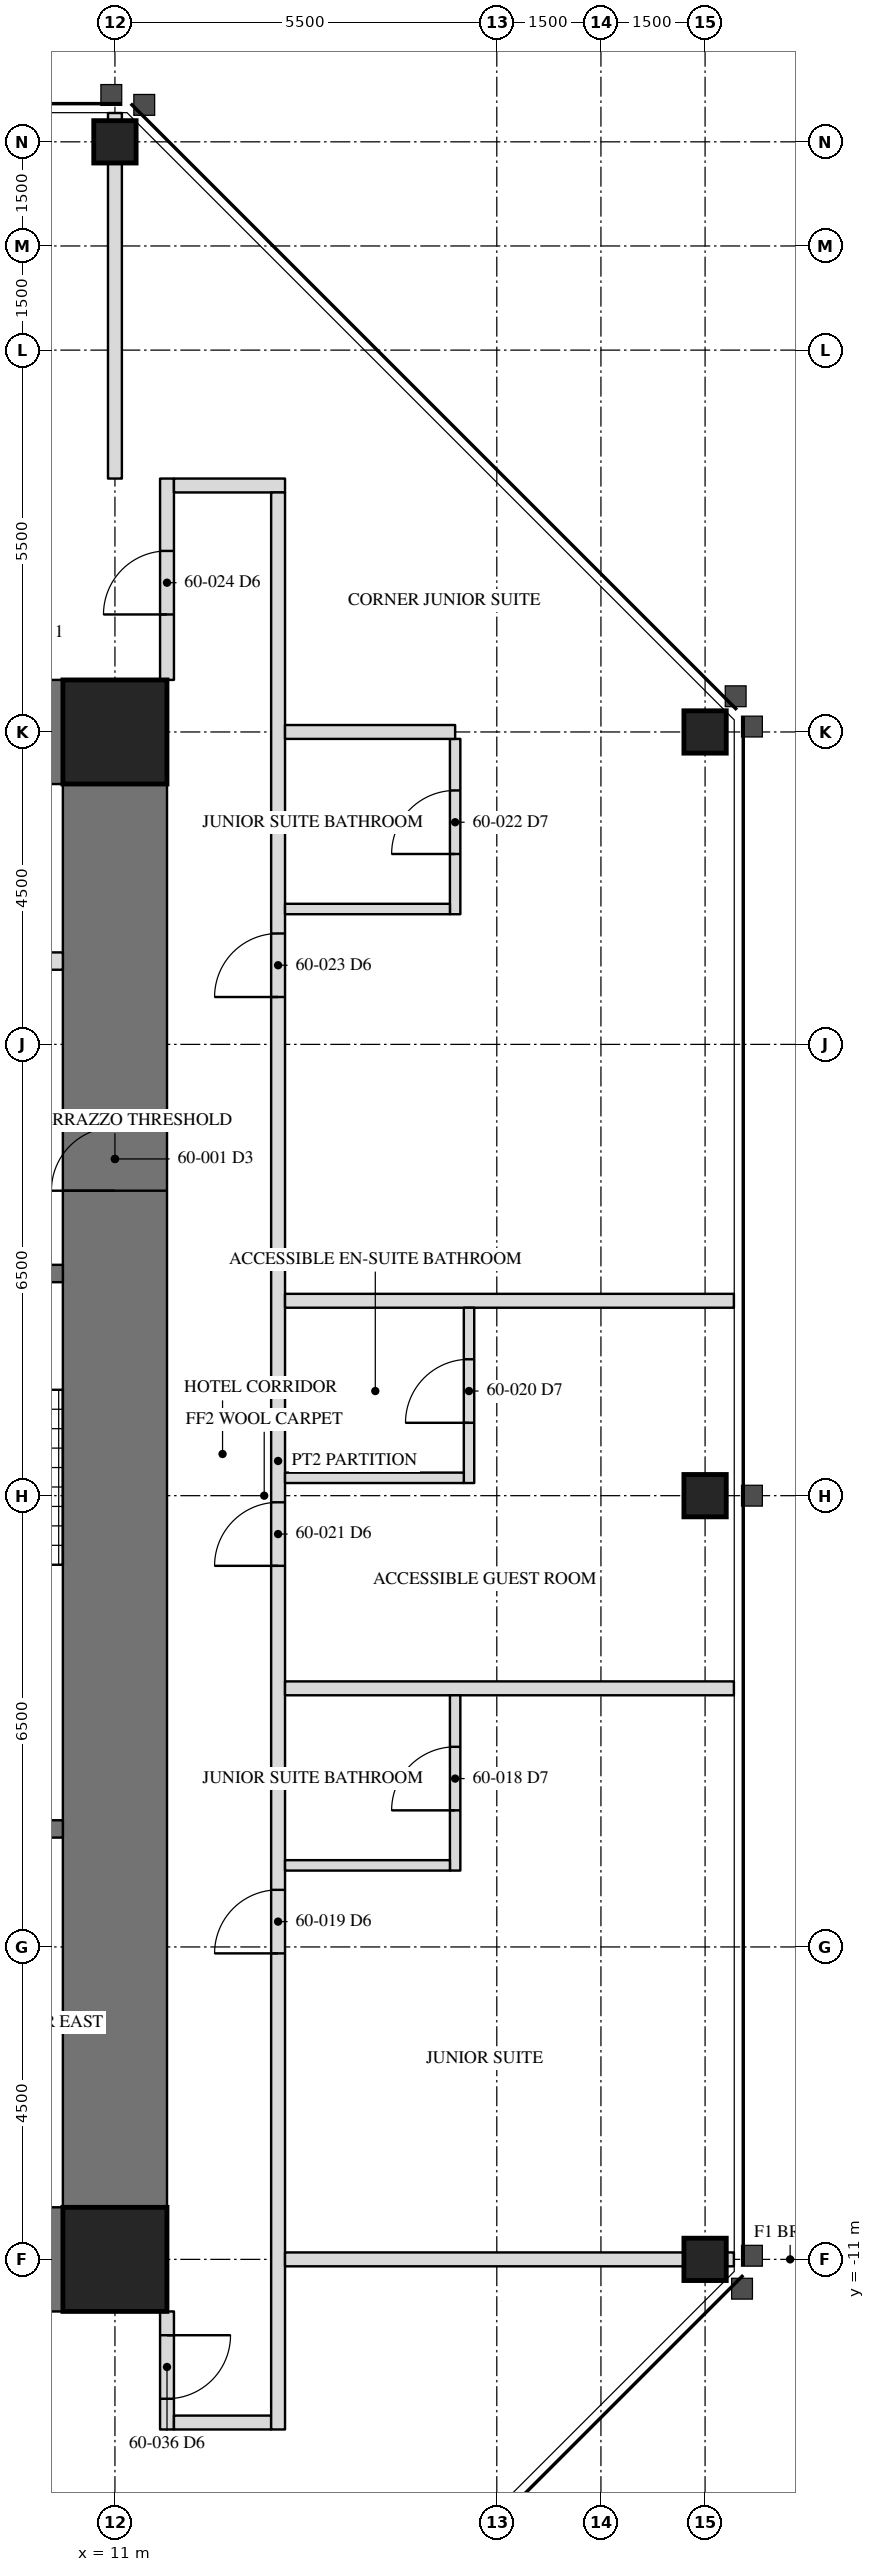
"""IFC4 building model, lengths in metres.
Left out: names, types, materials, properties, quantities, classifications, styles, units other than length and angle.
Written with IfcOpenShell. Run it as: python <this file> out.ifc"""

import sys

from ifc_helpers import new_model, si_unit, direction, frame, frame_2d, origin, origin_2d, place, context, subcontext, project, spatial, rectangle, hollow_rectangle, extrude, element, fill, save


model = new_model("IFC4")
c1 = context("Model", 3, precision=1e-05, world=origin(), true_north=direction((0.0, 1.0)))
c2 = subcontext(c1, "Body", "Model", "MODEL_VIEW")
j1 = project(units=[si_unit("LENGTHUNIT", "METRE"), si_unit("PLANEANGLEUNIT", "RADIAN")], contexts=[c1])
p1 = place(None, origin())
s1 = spatial("IfcSite", under=j1, at=p1, CompositionType="ELEMENT")
p2 = place(p1, origin())
s2 = spatial("IfcBuilding", under=s1, at=p2, CompositionType="ELEMENT")
p3 = place(p2, frame((0.0, 0.0, 246.7)))
s3 = spatial("IfcBuildingStorey", under=s2, at=p3, CompositionType="ELEMENT", Elevation=246.7)
for number, where, z_axis, x_axis in (
    (1, (19.5, -11.0, 0.0), (0.0, 0.0, 1.0), (0.0, 1.0, 0.0)),
    (2, (19.5, 0.0, 0.0), (0.0, 0.0, 1.0), (0.0, 1.0, 0.0)),
    (3, (19.5, 11.0, 0.0), (0.0, 0.0, 1.0), (0.0, 1.0, 0.0)),
    (4, (11.0, 19.5, 0.0), (0.0, 0.0, 1.0), (1.0, 0.0, 0.0)),
):
    element("IfcColumn", number, at=place(p3, frame(where, z_axis=z_axis, x_axis=x_axis)), inside=s3, PredefinedType="COLUMN", context=c2, shape_type="SweptSolid", body=[
        extrude(hollow_rectangle(XDim=0.61, YDim=0.61, WallThickness=0.051, at=origin_2d()), origin(), (0.0, 0.0, 1.0), 3.5),
    ])
p4 = place(p3, frame((11.0, -11.0, 0.0), z_axis=(0.0, 0.0, 1.0), x_axis=(0.0, 1.0, 0.0)))
e5 = element("IfcWall", 5, at=p4, inside=s3, PredefinedType="SHEAR", context=c2, shape_type="SweptSolid", body=[
    extrude(rectangle(XDim=22.0, YDim=1.5, at=frame_2d((11.0, 0.0))), origin(), (0.0, 0.0, 1.0), 3.5),
])
p5 = place(p4, frame((15.393, 0.0, 0.0)))
e6 = element("IfcOpeningElement", 6, at=p5, cuts=e5, PredefinedType="OPENING", context=c2, shape_type="SweptSolid", body=[
    extrude(rectangle(XDim=0.915, YDim=2.134, at=frame_2d((0.458, 1.067))), frame((0.0, 0.76, 0.0), z_axis=(0.0, -1.0, 0.0), x_axis=(1.0, 0.0, 0.0)), (0.0, 0.0, 1.0), 1.52),
])
for number, where, z_axis, x_axis in (
    (7, (11.0, 11.0, 0.0), (0.0, 0.0, 1.0), (-1.0, 0.0, 0.0)),
    (8, (6.5, -11.0, 0.0), (0.0, 0.0, 1.0), (1.0, 0.0, 0.0)),
):
    element("IfcWall", number, at=place(p3, frame(where, z_axis=z_axis, x_axis=x_axis)), inside=s3, PredefinedType="SHEAR", context=c2, shape_type="SweptSolid", body=[
        extrude(rectangle(XDim=4.5, YDim=1.5, at=frame_2d((2.25, 0.0))), origin(), (0.0, 0.0, 1.0), 3.5),
    ])
for number, where, z_axis, x_axis in (
    (9, (11.0, 11.0, 0.0), (0.0, 0.0, 1.0), (1.0, 0.0, 0.0)),
    (10, (11.0, -11.0, 0.0), (0.0, 0.0, 1.0), (1.0, 0.0, 0.0)),
):
    element("IfcColumn", number, at=place(p3, frame(where, z_axis=z_axis, x_axis=x_axis)), inside=s3, PredefinedType="COLUMN", context=c2, shape_type="SweptSolid", body=[
        extrude(hollow_rectangle(XDim=1.499, YDim=1.499, WallThickness=0.102, at=origin_2d()), origin(), (0.0, 0.0, 1.0), 3.5),
    ])
p6 = place(p3, frame((6.95, -4.8, 0.0), z_axis=(0.0, 0.0, 1.0), x_axis=(1.0, 0.0, 0.0)))
e11 = element("IfcWall", 11, at=p6, inside=s3, PredefinedType="SOLIDWALL", context=c2, shape_type="SweptSolid", body=[
    extrude(rectangle(XDim=3.3, YDim=0.25, at=frame_2d((1.65, 0.0))), origin(), (0.0, 0.0, 1.0), 3.31),
])
p7 = place(p3, frame((6.95, 3.2, 0.0), z_axis=(0.0, 0.0, 1.0), x_axis=(1.0, 0.0, 0.0)))
e12 = element("IfcWall", 12, at=p7, inside=s3, PredefinedType="SOLIDWALL", context=c2, shape_type="SweptSolid", body=[
    extrude(rectangle(XDim=3.3, YDim=0.25, at=frame_2d((1.65, 0.0))), origin(), (0.0, 0.0, 1.0), 3.31),
])
p8 = place(p7, frame((1.116, 0.0, 0.0)))
e13 = element("IfcOpeningElement", 13, at=p8, cuts=e12, PredefinedType="OPENING", context=c2, shape_type="SweptSolid", body=[
    extrude(rectangle(XDim=1.067, YDim=2.134, at=frame_2d((0.533, 1.067))), frame((0.0, 0.135, 0.0), z_axis=(0.0, -1.0, 0.0), x_axis=(1.0, 0.0, 0.0)), (0.0, 0.0, 1.0), 0.27),
])
p9 = place(p3, frame((6.95, 7.7, 0.0), z_axis=(0.0, 0.0, 1.0), x_axis=(1.0, 0.0, 0.0)))
e14 = element("IfcWall", 14, at=p9, inside=s3, PredefinedType="PARTITIONING", context=c2, shape_type="SweptSolid", body=[
    extrude(rectangle(XDim=3.3, YDim=0.25, at=frame_2d((1.65, 0.0))), origin(), (0.0, 0.0, 1.0), 3.31),
])
p10 = place(p9, frame((0.45, 0.0, 0.0)))
e15 = element("IfcOpeningElement", 15, at=p10, cuts=e14, PredefinedType="OPENING", context=c2, shape_type="SweptSolid", body=[
    extrude(rectangle(XDim=1.219, YDim=2.134, at=frame_2d((0.609, 1.067))), frame((0.0, 0.135, 0.0), z_axis=(0.0, -1.0, 0.0), x_axis=(1.0, 0.0, 0.0)), (0.0, 0.0, 1.0), 0.27),
])
p11 = place(p3, frame((11.75, 11.75, 0.0), z_axis=(0.0, 0.0, 1.0), x_axis=(0.0, 1.0, 0.0)))
e16 = element("IfcWall", 16, at=p11, inside=s3, PredefinedType="PARTITIONING", context=c2, shape_type="SweptSolid", body=[
    extrude(rectangle(XDim=2.9, YDim=0.2, at=frame_2d((1.45, 0.0))), origin(), (0.0, 0.0, 1.0), 3.31),
])
p12 = place(p11, frame((0.942, 0.0, 0.0)))
e17 = element("IfcOpeningElement", 17, at=p12, cuts=e16, PredefinedType="OPENING", context=c2, shape_type="SweptSolid", body=[
    extrude(rectangle(XDim=0.915, YDim=2.134, at=frame_2d((0.458, 1.067))), frame((0.0, 0.11, 0.0), z_axis=(0.0, -1.0, 0.0), x_axis=(1.0, 0.0, 0.0)), (0.0, 0.0, 1.0), 0.22),
])
p13 = place(p3, frame((13.45, 14.55, 0.0), z_axis=(0.0, 0.0, 1.0), x_axis=(-1.0, 0.0, 0.0)))
e18 = element("IfcWall", 18, at=p13, inside=s3, PredefinedType="PARTITIONING", context=c2, shape_type="SweptSolid", body=[
    extrude(rectangle(XDim=1.6, YDim=0.2, at=frame_2d((0.8, 0.0))), origin(), (0.0, 0.0, 1.0), 3.31),
])
p14 = place(p3, frame((11.75, -11.75, 0.0), z_axis=(0.0, 0.0, 1.0), x_axis=(0.0, -1.0, 0.0)))
e19 = element("IfcWall", 19, at=p14, inside=s3, PredefinedType="PARTITIONING", context=c2, shape_type="SweptSolid", body=[
    extrude(rectangle(XDim=1.7, YDim=0.2, at=frame_2d((0.85, 0.0))), origin(), (0.0, 0.0, 1.0), 3.31),
])
p15 = place(p14, frame((0.343, 0.0, 0.0)))
e20 = element("IfcOpeningElement", 20, at=p15, cuts=e19, PredefinedType="OPENING", context=c2, shape_type="SweptSolid", body=[
    extrude(rectangle(XDim=0.915, YDim=2.134, at=frame_2d((0.458, 1.067))), frame((0.0, 0.11, 0.0), z_axis=(0.0, -1.0, 0.0), x_axis=(1.0, 0.0, 0.0)), (0.0, 0.0, 1.0), 0.22),
])
p16 = place(p3, frame((11.85, -13.35, 0.0), z_axis=(0.0, 0.0, 1.0), x_axis=(1.0, 0.0, 0.0)))
e21 = element("IfcWall", 21, at=p16, inside=s3, PredefinedType="PARTITIONING", context=c2, shape_type="SweptSolid", body=[
    extrude(rectangle(XDim=1.4, YDim=0.2, at=frame_2d((0.7, 0.0))), origin(), (0.0, 0.0, 1.0), 3.31),
])
p17 = place(p3, frame((13.35, -13.45, 0.0), z_axis=(0.0, 0.0, 1.0), x_axis=(0.0, 1.0, 0.0)))
e22 = element("IfcWall", 22, at=p17, inside=s3, PredefinedType="PARTITIONING", context=c2, shape_type="SweptSolid", body=[
    extrude(rectangle(XDim=27.9, YDim=0.2, at=frame_2d((13.95, 0.0))), origin(), (0.0, 0.0, 1.0), 3.31),
])
p18 = place(p17, frame((6.857, 0.0, 0.0)))
e23 = element("IfcOpeningElement", 23, at=p18, cuts=e22, PredefinedType="OPENING", context=c2, shape_type="SweptSolid", body=[
    extrude(rectangle(XDim=0.915, YDim=2.134, at=frame_2d((0.458, 1.067))), frame((0.0, 0.11, 0.0), z_axis=(0.0, -1.0, 0.0), x_axis=(1.0, 0.0, 0.0)), (0.0, 0.0, 1.0), 0.22),
])
p19 = place(p17, frame((12.439, 0.0, 0.0)))
e24 = element("IfcOpeningElement", 24, at=p19, cuts=e22, PredefinedType="OPENING", context=c2, shape_type="SweptSolid", body=[
    extrude(rectangle(XDim=0.915, YDim=2.134, at=frame_2d((0.458, 1.067))), frame((0.0, 0.11, 0.0), z_axis=(0.0, -1.0, 0.0), x_axis=(1.0, 0.0, 0.0)), (0.0, 0.0, 1.0), 0.22),
])
p20 = place(p17, frame((20.633, 0.0, 0.0)))
e25 = element("IfcOpeningElement", 25, at=p20, cuts=e22, PredefinedType="OPENING", context=c2, shape_type="SweptSolid", body=[
    extrude(rectangle(XDim=0.915, YDim=2.134, at=frame_2d((0.458, 1.067))), frame((0.0, 0.11, 0.0), z_axis=(0.0, -1.0, 0.0), x_axis=(1.0, 0.0, 0.0)), (0.0, 0.0, 1.0), 0.22),
])
p21 = place(p3, frame((13.45, -11.0, 0.0), z_axis=(0.0, 0.0, 1.0), x_axis=(1.0, 0.0, 0.0)))
e26 = element("IfcWall", 26, at=p21, inside=s3, PredefinedType="PARTITIONING", context=c2, shape_type="SweptSolid", body=[
    extrude(rectangle(XDim=6.465, YDim=0.2, at=frame_2d((3.232, 0.0))), origin(), (0.0, 0.0, 1.0), 2.802),
])
for number, where, z_axis, x_axis in (
    (27, (13.45, -2.775, 0.0), (0.0, 0.0, 1.0), (1.0, 0.0, 0.0)),
    (28, (13.45, 2.807, 0.0), (0.0, 0.0, 1.0), (1.0, 0.0, 0.0)),
):
    element("IfcWall", number, at=place(p3, frame(where, z_axis=z_axis, x_axis=x_axis)), inside=s3, PredefinedType="PARTITIONING", context=c2, shape_type="SweptSolid", body=[
        extrude(rectangle(XDim=6.465, YDim=0.2, at=frame_2d((3.232, 0.0))), origin(), (0.0, 0.0, 1.0), 3.31),
    ])
p22 = place(p3, frame((15.9, -5.4, 0.0), z_axis=(0.0, 0.0, 1.0), x_axis=(0.0, 1.0, 0.0)))
e29 = element("IfcWall", 29, at=p22, inside=s3, PredefinedType="PARTITIONING", context=c2, shape_type="SweptSolid", body=[
    extrude(rectangle(XDim=2.525, YDim=0.15, at=frame_2d((1.262, 0.0))), origin(), (0.0, 0.0, 1.0), 3.31),
])
p23 = place(p22, frame((0.867, 0.0, 0.0)))
e30 = element("IfcOpeningElement", 30, at=p23, cuts=e29, PredefinedType="OPENING", context=c2, shape_type="SweptSolid", body=[
    extrude(rectangle(XDim=0.915, YDim=2.032, at=frame_2d((0.458, 1.016))), frame((0.0, 0.085, 0.0), z_axis=(0.0, -1.0, 0.0), x_axis=(1.0, 0.0, 0.0)), (0.0, 0.0, 1.0), 0.17),
])
p24 = place(p3, frame((13.45, -5.325, 0.0), z_axis=(0.0, 0.0, 1.0), x_axis=(1.0, 0.0, 0.0)))
e31 = element("IfcWall", 31, at=p24, inside=s3, PredefinedType="PARTITIONING", context=c2, shape_type="SweptSolid", body=[
    extrude(rectangle(XDim=2.375, YDim=0.15, at=frame_2d((1.188, 0.0))), origin(), (0.0, 0.0, 1.0), 3.31),
])
p25 = place(p3, frame((16.1, 0.182, 0.0), z_axis=(0.0, 0.0, 1.0), x_axis=(0.0, 1.0, 0.0)))
e32 = element("IfcWall", 32, at=p25, inside=s3, PredefinedType="PARTITIONING", context=c2, shape_type="SweptSolid", body=[
    extrude(rectangle(XDim=2.525, YDim=0.15, at=frame_2d((1.263, 0.0))), origin(), (0.0, 0.0, 1.0), 3.31),
])
p26 = place(p25, frame((0.867, 0.0, 0.0)))
e33 = element("IfcOpeningElement", 33, at=p26, cuts=e32, PredefinedType="OPENING", context=c2, shape_type="SweptSolid", body=[
    extrude(rectangle(XDim=0.915, YDim=2.032, at=frame_2d((0.458, 1.016))), frame((0.0, 0.085, 0.0), z_axis=(0.0, -1.0, 0.0), x_axis=(1.0, 0.0, 0.0)), (0.0, 0.0, 1.0), 0.17),
])
p27 = place(p3, frame((13.45, 0.257, 0.0), z_axis=(0.0, 0.0, 1.0), x_axis=(1.0, 0.0, 0.0)))
e34 = element("IfcWall", 34, at=p27, inside=s3, PredefinedType="PARTITIONING", context=c2, shape_type="SweptSolid", body=[
    extrude(rectangle(XDim=2.575, YDim=0.15, at=frame_2d((1.288, 0.0))), origin(), (0.0, 0.0, 1.0), 3.31),
])
p28 = place(p3, frame((15.9, 8.375, 0.0), z_axis=(0.0, 0.0, 1.0), x_axis=(0.0, 1.0, 0.0)))
e35 = element("IfcWall", 35, at=p28, inside=s3, PredefinedType="PARTITIONING", context=c2, shape_type="SweptSolid", body=[
    extrude(rectangle(XDim=2.525, YDim=0.15, at=frame_2d((1.262, 0.0))), origin(), (0.0, 0.0, 1.0), 3.31),
])
p29 = place(p28, frame((0.867, 0.0, 0.0)))
e36 = element("IfcOpeningElement", 36, at=p29, cuts=e35, PredefinedType="OPENING", context=c2, shape_type="SweptSolid", body=[
    extrude(rectangle(XDim=0.915, YDim=2.032, at=frame_2d((0.458, 1.016))), frame((0.0, 0.085, 0.0), z_axis=(0.0, -1.0, 0.0), x_axis=(1.0, 0.0, 0.0)), (0.0, 0.0, 1.0), 0.17),
])
p30 = place(p3, frame((13.45, 8.45, 0.0), z_axis=(0.0, 0.0, 1.0), x_axis=(1.0, 0.0, 0.0)))
e37 = element("IfcWall", 37, at=p30, inside=s3, PredefinedType="PARTITIONING", context=c2, shape_type="SweptSolid", body=[
    extrude(rectangle(XDim=2.375, YDim=0.15, at=frame_2d((1.188, 0.0))), origin(), (0.0, 0.0, 1.0), 3.31),
])
p31 = place(p3, frame((13.45, 11.0, 0.0), z_axis=(0.0, 0.0, 1.0), x_axis=(1.0, 0.0, 0.0)))
e38 = element("IfcWall", 38, at=p31, inside=s3, PredefinedType="PARTITIONING", context=c2, shape_type="SweptSolid", body=[
    extrude(rectangle(XDim=2.45, YDim=0.2, at=frame_2d((1.225, 0.0))), origin(), (0.0, 0.0, 1.0), 2.802),
])
p32 = place(p3, frame((11.0, 14.65, 0.0), z_axis=(0.0, 0.0, 1.0), x_axis=(0.0, 1.0, 0.0)))
e39 = element("IfcWall", 39, at=p32, inside=s3, PredefinedType="PARTITIONING", context=c2, shape_type="SweptSolid", body=[
    extrude(rectangle(XDim=5.265, YDim=0.2, at=frame_2d((2.633, 0.0))), origin(), (0.0, 0.0, 1.0), 2.802),
])
p33 = place(p5, origin())
e40 = element("IfcDoor", 40, at=p33, inside=s3, OperationType="SINGLE_SWING_RIGHT", PredefinedType="DOOR", context=c2, shape_type="SweptSolid", body=[
    extrude(rectangle(XDim=0.915, YDim=2.134, at=frame_2d((0.458, 1.067))), frame((0.0, -0.675, 0.0), z_axis=(0.0, -1.0, 0.0), x_axis=(1.0, 0.0, 0.0)), (0.0, 0.0, 1.0), 0.05),
])
fill(e6, e40)
p34 = place(p23, origin())
e41 = element("IfcDoor", 41, at=p34, inside=s3, OperationType="SINGLE_SWING_LEFT", PredefinedType="DOOR", context=c2, shape_type="SweptSolid", body=[
    extrude(rectangle(XDim=0.915, YDim=2.032, at=frame_2d((0.458, 1.016))), frame((0.0, 0.025, 0.0), z_axis=(0.0, -1.0, 0.0), x_axis=(1.0, 0.0, 0.0)), (0.0, 0.0, 1.0), 0.05),
])
fill(e30, e41)
p35 = place(p18, origin())
e42 = element("IfcDoor", 42, at=p35, inside=s3, OperationType="SINGLE_SWING_LEFT", PredefinedType="DOOR", context=c2, shape_type="SweptSolid", body=[
    extrude(rectangle(XDim=0.915, YDim=2.134, at=frame_2d((0.458, 1.067))), frame((0.0, 0.025, 0.0), z_axis=(0.0, -1.0, 0.0), x_axis=(1.0, 0.0, 0.0)), (0.0, 0.0, 1.0), 0.05),
])
fill(e23, e42)
p36 = place(p26, origin())
e43 = element("IfcDoor", 43, at=p36, inside=s3, OperationType="SINGLE_SWING_LEFT", PredefinedType="DOOR", context=c2, shape_type="SweptSolid", body=[
    extrude(rectangle(XDim=0.915, YDim=2.032, at=frame_2d((0.458, 1.016))), frame((0.0, 0.025, 0.0), z_axis=(0.0, -1.0, 0.0), x_axis=(1.0, 0.0, 0.0)), (0.0, 0.0, 1.0), 0.05),
])
fill(e33, e43)
p37 = place(p19, origin())
e44 = element("IfcDoor", 44, at=p37, inside=s3, OperationType="SINGLE_SWING_LEFT", PredefinedType="DOOR", context=c2, shape_type="SweptSolid", body=[
    extrude(rectangle(XDim=0.915, YDim=2.134, at=frame_2d((0.458, 1.067))), frame((0.0, 0.025, 0.0), z_axis=(0.0, -1.0, 0.0), x_axis=(1.0, 0.0, 0.0)), (0.0, 0.0, 1.0), 0.05),
])
fill(e24, e44)
p38 = place(p29, origin())
e45 = element("IfcDoor", 45, at=p38, inside=s3, OperationType="SINGLE_SWING_LEFT", PredefinedType="DOOR", context=c2, shape_type="SweptSolid", body=[
    extrude(rectangle(XDim=0.915, YDim=2.032, at=frame_2d((0.458, 1.016))), frame((0.0, 0.025, 0.0), z_axis=(0.0, -1.0, 0.0), x_axis=(1.0, 0.0, 0.0)), (0.0, 0.0, 1.0), 0.05),
])
fill(e36, e45)
p39 = place(p20, origin())
e46 = element("IfcDoor", 46, at=p39, inside=s3, OperationType="SINGLE_SWING_LEFT", PredefinedType="DOOR", context=c2, shape_type="SweptSolid", body=[
    extrude(rectangle(XDim=0.915, YDim=2.134, at=frame_2d((0.458, 1.067))), frame((0.0, 0.025, 0.0), z_axis=(0.0, -1.0, 0.0), x_axis=(1.0, 0.0, 0.0)), (0.0, 0.0, 1.0), 0.05),
])
fill(e25, e46)
p40 = place(p12, origin())
e47 = element("IfcDoor", 47, at=p40, inside=s3, OperationType="SINGLE_SWING_LEFT", PredefinedType="DOOR", context=c2, shape_type="SweptSolid", body=[
    extrude(rectangle(XDim=0.915, YDim=2.134, at=frame_2d((0.458, 1.067))), frame((0.0, 0.025, 0.0), z_axis=(0.0, -1.0, 0.0), x_axis=(1.0, 0.0, 0.0)), (0.0, 0.0, 1.0), 0.05),
])
fill(e17, e47)
p41 = place(p15, origin())
e48 = element("IfcDoor", 48, at=p41, inside=s3, OperationType="SINGLE_SWING_LEFT", PredefinedType="DOOR", context=c2, shape_type="SweptSolid", body=[
    extrude(rectangle(XDim=0.915, YDim=2.134, at=frame_2d((0.458, 1.067))), frame((0.0, 0.025, 0.0), z_axis=(0.0, -1.0, 0.0), x_axis=(1.0, 0.0, 0.0)), (0.0, 0.0, 1.0), 0.05),
])
fill(e20, e48)
save(model, sys.argv[1])
